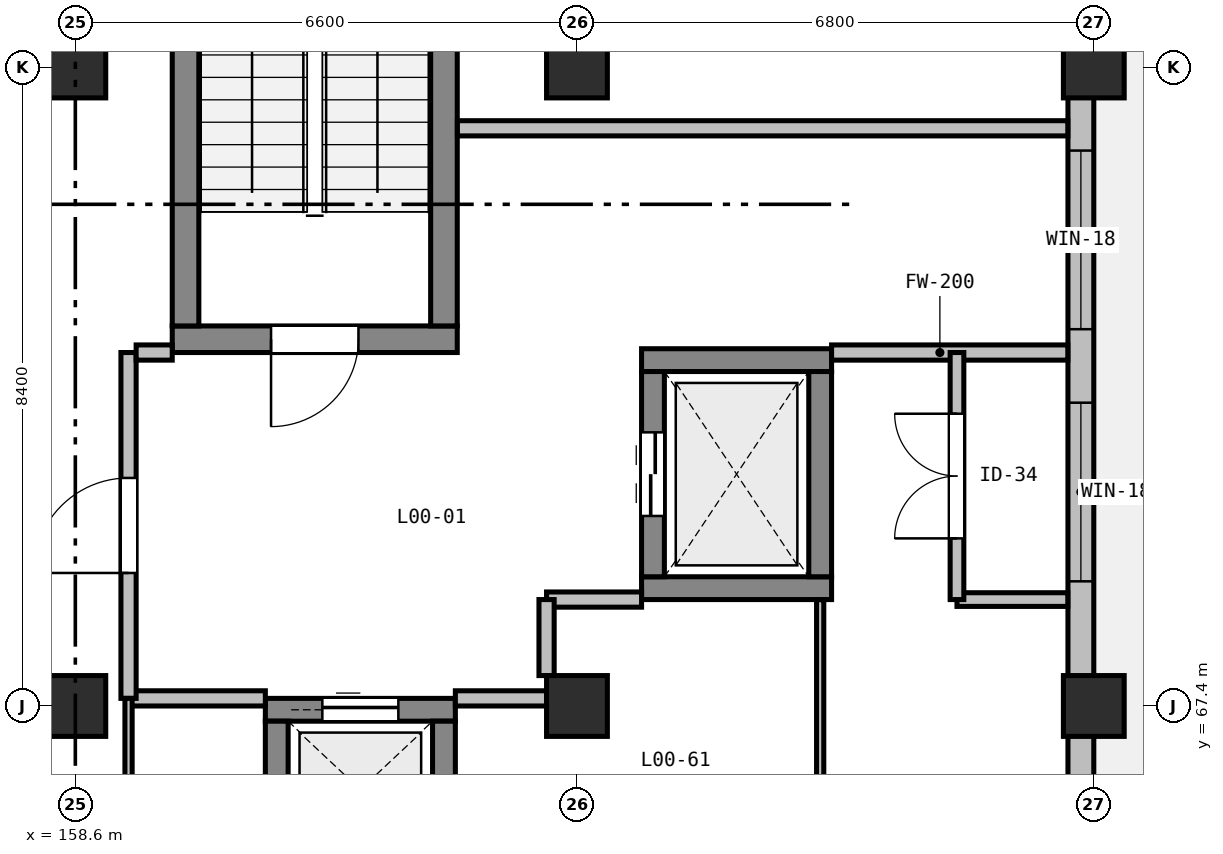
"""IFC4 building model, lengths in metres.
Left out: names, types, materials, properties, quantities, classifications, styles, units other than length and angle.
Written with IfcOpenShell. Run it as: python <this file> out.ifc"""

import sys

from ifc_helpers import new_model, si_unit, direction, frame, frame_2d, origin, origin_2d, place, context, subcontext, project, spatial, rectangle, extrude, element, fill, save


model = new_model("IFC4")
c1 = context("Model", 3, precision=1e-05, world=origin(), true_north=direction((0.0, 1.0)))
c2 = subcontext(c1, "Body", "Model", "MODEL_VIEW")
j1 = project(units=[si_unit("LENGTHUNIT", "METRE"), si_unit("PLANEANGLEUNIT", "RADIAN")], contexts=[c1])
p1 = place(None, origin())
s1 = spatial("IfcSite", under=j1, at=p1, CompositionType="ELEMENT")
p2 = place(p1, origin())
s2 = spatial("IfcBuilding", under=s1, at=p2, CompositionType="ELEMENT")
p3 = place(p2, origin())
s3 = spatial("IfcBuildingStorey", under=s2, at=p3, CompositionType="ELEMENT", Elevation=0.0)
for number, where, z_axis, x_axis in (
    (1, (158.6, 67.4, 0.0), (0.0, 0.0, 1.0), (1.0, 0.0, 0.0)),
    (2, (158.6, 75.8, 0.0), (0.0, 0.0, 1.0), (1.0, 0.0, 0.0)),
    (3, (165.2, 67.4, 0.0), (0.0, 0.0, 1.0), (1.0, 0.0, 0.0)),
    (4, (165.2, 75.8, 0.0), (0.0, 0.0, 1.0), (1.0, 0.0, 0.0)),
    (5, (172.0, 67.4, 0.0), (0.0, 0.0, 1.0), (1.0, 0.0, 0.0)),
    (6, (172.0, 75.8, 0.0), (0.0, 0.0, 1.0), (1.0, 0.0, 0.0)),
):
    element("IfcColumn", number, at=place(p3, frame(where, z_axis=z_axis, x_axis=x_axis)), inside=s3, PredefinedType="COLUMN", context=c2, shape_type="SweptSolid", body=[
        extrude(rectangle(XDim=0.8, YDim=0.8, at=origin_2d()), origin(), (0.0, 0.0, 1.0), 5.4),
    ])
p4 = place(p3, frame((163.625, 72.225, 0.0), z_axis=(0.0, 0.0, 1.0), x_axis=(-1.0, 0.0, 0.0)))
e7 = element("IfcWall", 7, at=p4, inside=s3, PredefinedType="SHEAR", context=c2, shape_type="SweptSolid", body=[
    extrude(rectangle(XDim=3.75, YDim=0.35, at=frame_2d((1.875, 0.0))), origin(), (0.0, 0.0, 1.0), 5.4),
])
p5 = place(p4, frame((1.3, 0.0, 0.0)))
e8 = element("IfcOpeningElement", 8, at=p5, cuts=e7, PredefinedType="OPENING", context=c2, shape_type="SweptSolid", body=[
    extrude(rectangle(XDim=1.15, YDim=2.15, at=frame_2d((0.575, 1.075))), frame((0.0, 0.185, 0.0), z_axis=(0.0, -1.0, 0.0), x_axis=(1.0, 0.0, 0.0)), (0.0, 0.0, 1.0), 0.37),
])
for number, where, z_axis, x_axis in (
    (9, (160.05, 72.4, 0.0), (0.0, 0.0, 1.0), (0.0, 1.0, 0.0)),
    (10, (163.45, 72.4, 0.0), (0.0, 0.0, 1.0), (0.0, 1.0, 0.0)),
):
    element("IfcWall", number, at=place(p3, frame(where, z_axis=z_axis, x_axis=x_axis)), inside=s3, PredefinedType="SHEAR", context=c2, shape_type="SweptSolid", body=[
        extrude(rectangle(XDim=7.375, YDim=0.35, at=frame_2d((3.688, 0.0))), origin(), (0.0, 0.0, 1.0), 5.4),
    ])
for number, where, z_axis, x_axis in (
    (11, (166.05, 68.95, 0.0), (0.0, 0.0, 1.0), (1.0, 0.0, 0.0)),
    (12, (166.05, 71.95, 0.0), (0.0, 0.0, 1.0), (1.0, 0.0, 0.0)),
):
    element("IfcWall", number, at=place(p3, frame(where, z_axis=z_axis, x_axis=x_axis)), inside=s3, PredefinedType="SHEAR", context=c2, shape_type="SweptSolid", body=[
        extrude(rectangle(XDim=2.5, YDim=0.3, at=frame_2d((1.25, 0.0))), origin(), (0.0, 0.0, 1.0), 5.4),
    ])
p6 = place(p3, frame((166.2, 69.1, 0.0), z_axis=(0.0, 0.0, 1.0), x_axis=(0.0, 1.0, 0.0)))
e13 = element("IfcWall", 13, at=p6, inside=s3, PredefinedType="SHEAR", context=c2, shape_type="SweptSolid", body=[
    extrude(rectangle(XDim=2.7, YDim=0.3, at=frame_2d((1.35, 0.0))), origin(), (0.0, 0.0, 1.0), 5.4),
])
p7 = place(p6, frame((0.8, 0.0, 0.0)))
e14 = element("IfcOpeningElement", 14, at=p7, cuts=e13, PredefinedType="OPENING", context=c2, shape_type="SweptSolid", body=[
    extrude(rectangle(XDim=1.1, YDim=2.1, at=frame_2d((0.55, 1.05))), frame((0.0, 0.16, 0.0), z_axis=(0.0, -1.0, 0.0), x_axis=(1.0, 0.0, 0.0)), (0.0, 0.0, 1.0), 0.32),
])
p8 = place(p3, frame((168.4, 69.1, 0.0), z_axis=(0.0, 0.0, 1.0), x_axis=(0.0, 1.0, 0.0)))
e15 = element("IfcWall", 15, at=p8, inside=s3, PredefinedType="SHEAR", context=c2, shape_type="SweptSolid", body=[
    extrude(rectangle(XDim=2.7, YDim=0.3, at=frame_2d((1.35, 0.0))), origin(), (0.0, 0.0, 1.0), 5.4),
])
p9 = place(p3, frame((161.1, 67.35, 0.0), z_axis=(0.0, 0.0, 1.0), x_axis=(1.0, 0.0, 0.0)))
e16 = element("IfcWall", 16, at=p9, inside=s3, PredefinedType="SHEAR", context=c2, shape_type="SweptSolid", body=[
    extrude(rectangle(XDim=2.5, YDim=0.3, at=frame_2d((1.25, 0.0))), origin(), (0.0, 0.0, 1.0), 5.4),
])
p10 = place(p9, frame((0.75, 0.0, 0.0)))
e17 = element("IfcOpeningElement", 17, at=p10, cuts=e16, PredefinedType="OPENING", context=c2, shape_type="SweptSolid", body=[
    extrude(rectangle(XDim=1.0, YDim=2.1, at=frame_2d((0.5, 1.05))), frame((0.0, 0.16, 0.0), z_axis=(0.0, -1.0, 0.0), x_axis=(1.0, 0.0, 0.0)), (0.0, 0.0, 1.0), 0.32),
])
for number, where, z_axis, x_axis in (
    (18, (161.25, 65.4, 0.0), (0.0, 0.0, 1.0), (0.0, 1.0, 0.0)),
    (19, (163.45, 65.4, 0.0), (0.0, 0.0, 1.0), (0.0, 1.0, 0.0)),
):
    element("IfcWall", number, at=place(p3, frame(where, z_axis=z_axis, x_axis=x_axis)), inside=s3, PredefinedType="SHEAR", context=c2, shape_type="SweptSolid", body=[
        extrude(rectangle(XDim=1.8, YDim=0.3, at=frame_2d((0.9, 0.0))), origin(), (0.0, 0.0, 1.0), 5.4),
    ])
p11 = place(p3, frame((171.83, 83.86, 0.0), z_axis=(0.0, 0.0, 1.0), x_axis=(0.0, -1.0, 0.0)))
e20 = element("IfcWall", 20, at=p11, inside=s3, PredefinedType="STANDARD", context=c2, shape_type="SweptSolid", body=[
    extrude(rectangle(XDim=8.06, YDim=0.34, at=frame_2d((4.03, 0.0))), origin(), (0.0, 0.0, 1.0), 4.685),
])
p12 = place(p11, frame((1.86, 0.0, 0.0)))
e21 = element("IfcOpeningElement", 21, at=p12, cuts=e20, PredefinedType="OPENING", context=c2, shape_type="SweptSolid", body=[
    extrude(rectangle(XDim=1.6, YDim=2.2, at=frame_2d((0.8, 1.1))), frame((0.0, 0.18, 0.0), z_axis=(0.0, -1.0, 0.0), x_axis=(1.0, 0.0, 0.0)), (0.0, 0.0, 1.0), 0.36),
])
p13 = place(p3, frame((171.83, 75.8, 0.0), z_axis=(0.0, 0.0, 1.0), x_axis=(0.0, -1.0, 0.0)))
e22 = element("IfcWall", 22, at=p13, inside=s3, PredefinedType="STANDARD", context=c2, shape_type="SweptSolid", body=[
    extrude(rectangle(XDim=8.4, YDim=0.34, at=frame_2d((4.2, 0.0))), origin(), (0.0, 0.0, 1.0), 4.685),
])
p14 = place(p13, frame((1.093, 0.0, 0.9)))
e23 = element("IfcOpeningElement", 23, at=p14, cuts=e22, PredefinedType="OPENING", context=c2, shape_type="SweptSolid", body=[
    extrude(rectangle(XDim=2.35, YDim=1.5, at=frame_2d((1.175, 0.75))), frame((0.0, 0.18, 0.0), z_axis=(0.0, -1.0, 0.0), x_axis=(1.0, 0.0, 0.0)), (0.0, 0.0, 1.0), 0.36),
])
p15 = place(p13, frame((4.41, 0.0, 0.9)))
e24 = element("IfcOpeningElement", 24, at=p15, cuts=e22, PredefinedType="OPENING", context=c2, shape_type="SweptSolid", body=[
    extrude(rectangle(XDim=2.35, YDim=1.5, at=frame_2d((1.175, 0.75))), frame((0.0, 0.18, 0.0), z_axis=(0.0, -1.0, 0.0), x_axis=(1.0, 0.0, 0.0)), (0.0, 0.0, 1.0), 0.36),
])
p16 = place(p3, frame((171.83, 67.4, 0.0), z_axis=(0.0, 0.0, 1.0), x_axis=(0.0, -1.0, 0.0)))
e25 = element("IfcWall", 25, at=p16, inside=s3, PredefinedType="STANDARD", context=c2, shape_type="SweptSolid", body=[
    extrude(rectangle(XDim=8.06, YDim=0.34, at=frame_2d((4.03, 0.0))), origin(), (0.0, 0.0, 1.0), 4.685),
])
p17 = place(p16, frame((1.64, 0.0, 0.75)))
e26 = element("IfcOpeningElement", 26, at=p17, cuts=e25, PredefinedType="OPENING", context=c2, shape_type="SweptSolid", body=[
    extrude(rectangle(XDim=1.3, YDim=2.4, at=frame_2d((0.65, 1.2))), frame((0.0, 0.18, 0.0), z_axis=(0.0, -1.0, 0.0), x_axis=(1.0, 0.0, 0.0)), (0.0, 0.0, 1.0), 0.36),
])
p18 = place(p16, frame((5.234, 0.0, 0.75)))
e27 = element("IfcOpeningElement", 27, at=p18, cuts=e25, PredefinedType="OPENING", context=c2, shape_type="SweptSolid", body=[
    extrude(rectangle(XDim=1.3, YDim=2.4, at=frame_2d((0.65, 1.2))), frame((0.0, 0.18, 0.0), z_axis=(0.0, -1.0, 0.0), x_axis=(1.0, 0.0, 0.0)), (0.0, 0.0, 1.0), 0.36),
])
p19 = place(p3, frame((163.627, 75.0, 0.0), z_axis=(0.0, 0.0, 1.0), x_axis=(1.0, 0.0, 0.0)))
e28 = element("IfcWall", 28, at=p19, inside=s3, PredefinedType="PARTITIONING", context=c2, shape_type="SweptSolid", body=[
    extrude(rectangle(XDim=8.031, YDim=0.2, at=frame_2d((4.016, 0.0))), origin(), (0.0, 0.0, 1.0), 4.535),
])
p20 = place(p3, frame((171.658, 72.05, 0.0), z_axis=(0.0, 0.0, 1.0), x_axis=(-1.0, 0.0, 0.0)))
e29 = element("IfcWall", 29, at=p20, inside=s3, PredefinedType="PARTITIONING", context=c2, shape_type="SweptSolid", body=[
    extrude(rectangle(XDim=3.108, YDim=0.2, at=frame_2d((1.554, 0.0))), origin(), (0.0, 0.0, 1.0), 4.685),
])
p21 = place(p3, frame((166.05, 68.8, 0.0), z_axis=(0.0, 0.0, 1.0), x_axis=(-1.0, 0.0, 0.0)))
e30 = element("IfcWall", 30, at=p21, inside=s3, PredefinedType="PARTITIONING", context=c2, shape_type="SweptSolid", body=[
    extrude(rectangle(XDim=1.25, YDim=0.2, at=frame_2d((0.625, 0.0))), origin(), (0.0, 0.0, 1.0), 4.535),
])
p22 = place(p3, frame((164.8, 68.8, 0.0), z_axis=(0.0, 0.0, 1.0), x_axis=(0.0, -1.0, 0.0)))
e31 = element("IfcWall", 31, at=p22, inside=s3, PredefinedType="PARTITIONING", context=c2, shape_type="SweptSolid", body=[
    extrude(rectangle(XDim=1.0, YDim=0.2, at=frame_2d((0.5, 0.0))), origin(), (0.0, 0.0, 1.0), 5.095),
])
p23 = place(p3, frame((164.8, 67.5, 0.0), z_axis=(0.0, 0.0, 1.0), x_axis=(-1.0, 0.0, 0.0)))
e32 = element("IfcWall", 32, at=p23, inside=s3, PredefinedType="PARTITIONING", context=c2, shape_type="SweptSolid", body=[
    extrude(rectangle(XDim=1.2, YDim=0.2, at=frame_2d((0.6, 0.0))), origin(), (0.0, 0.0, 1.0), 4.735),
])
p24 = place(p3, frame((161.1, 67.5, 0.0), z_axis=(0.0, 0.0, 1.0), x_axis=(-1.0, 0.0, 0.0)))
e33 = element("IfcWall", 33, at=p24, inside=s3, PredefinedType="PARTITIONING", context=c2, shape_type="SweptSolid", body=[
    extrude(rectangle(XDim=1.8, YDim=0.2, at=frame_2d((0.9, 0.0))), origin(), (0.0, 0.0, 1.0), 4.735),
])
p25 = place(p3, frame((159.3, 67.5, 0.0), z_axis=(0.0, 0.0, 1.0), x_axis=(0.0, 1.0, 0.0)))
e34 = element("IfcWall", 34, at=p25, inside=s3, PredefinedType="PARTITIONING", context=c2, shape_type="SweptSolid", body=[
    extrude(rectangle(XDim=4.55, YDim=0.2, at=frame_2d((2.275, 0.0))), origin(), (0.0, 0.0, 1.0), 4.735),
])
p26 = place(p25, frame((1.65, 0.0, 0.0)))
e35 = element("IfcOpeningElement", 35, at=p26, cuts=e34, PredefinedType="OPENING", context=c2, shape_type="SweptSolid", body=[
    extrude(rectangle(XDim=1.25, YDim=2.15, at=frame_2d((0.625, 1.075))), frame((0.0, 0.11, 0.0), z_axis=(0.0, -1.0, 0.0), x_axis=(1.0, 0.0, 0.0)), (0.0, 0.0, 1.0), 0.22),
])
p27 = place(p3, frame((159.4, 72.05, 0.0), z_axis=(0.0, 0.0, 1.0), x_axis=(1.0, 0.0, 0.0)))
e36 = element("IfcWall", 36, at=p27, inside=s3, PredefinedType="PARTITIONING", context=c2, shape_type="SweptSolid", body=[
    extrude(rectangle(XDim=0.475, YDim=0.2, at=frame_2d((0.238, 0.0))), origin(), (0.0, 0.0, 1.0), 5.095),
])
p28 = place(p3, frame((168.4, 68.798, 0.0), z_axis=(0.0, 0.0, 1.0), x_axis=(0.0, -1.0, 0.0)))
e37 = element("IfcWall", 37, at=p28, inside=s3, PredefinedType="PARTITIONING", context=c2, shape_type="SweptSolid", body=[
    extrude(rectangle(XDim=6.198, YDim=0.095, at=frame_2d((3.099, 0.0))), origin(), (0.0, 0.0, 1.0), 4.735),
])
p29 = place(p3, frame((159.3, 65.05, 0.0), z_axis=(0.0, 0.0, 1.0), x_axis=(0.0, 1.0, 0.0)))
e38 = element("IfcWall", 38, at=p29, inside=s3, PredefinedType="PARTITIONING", context=c2, shape_type="SweptSolid", body=[
    extrude(rectangle(XDim=2.45, YDim=0.095, at=frame_2d((1.225, 0.0))), origin(), (0.0, 0.0, 1.0), 4.735),
])
p30 = place(p3, frame((171.658, 68.8, 0.0), z_axis=(0.0, 0.0, 1.0), x_axis=(-1.0, 0.0, 0.0)))
e39 = element("IfcWall", 39, at=p30, inside=s3, PredefinedType="PARTITIONING", context=c2, shape_type="SweptSolid", body=[
    extrude(rectangle(XDim=1.458, YDim=0.18, at=frame_2d((0.729, 0.0))), origin(), (0.0, 0.0, 1.0), 4.685),
])
p31 = place(p3, frame((170.2, 68.8, 0.0), z_axis=(0.0, 0.0, 1.0), x_axis=(0.0, 1.0, 0.0)))
e40 = element("IfcWall", 40, at=p31, inside=s3, PredefinedType="PARTITIONING", context=c2, shape_type="SweptSolid", body=[
    extrude(rectangle(XDim=3.25, YDim=0.18, at=frame_2d((1.625, 0.0))), origin(), (0.0, 0.0, 1.0), 5.095),
])
p32 = place(p31, frame((0.805, 0.0, 0.0)))
e41 = element("IfcOpeningElement", 41, at=p32, cuts=e40, PredefinedType="OPENING", context=c2, shape_type="SweptSolid", body=[
    extrude(rectangle(XDim=1.64, YDim=2.2, at=frame_2d((0.82, 1.1))), frame((0.0, 0.1, 0.0), z_axis=(0.0, -1.0, 0.0), x_axis=(1.0, 0.0, 0.0)), (0.0, 0.0, 1.0), 0.2),
])
p33 = place(p14, origin())
e42 = element("IfcWindow", 42, at=p33, inside=s3, PartitioningType="SINGLE_PANEL", PredefinedType="WINDOW", context=c2, shape_type="SweptSolid", body=[
    extrude(rectangle(XDim=2.35, YDim=1.5, at=frame_2d((1.175, 0.75))), frame((0.0, 0.03, 0.0), z_axis=(0.0, -1.0, 0.0), x_axis=(1.0, 0.0, 0.0)), (0.0, 0.0, 1.0), 0.06),
])
fill(e23, e42)
p34 = place(p15, origin())
e43 = element("IfcWindow", 43, at=p34, inside=s3, PartitioningType="SINGLE_PANEL", PredefinedType="WINDOW", context=c2, shape_type="SweptSolid", body=[
    extrude(rectangle(XDim=2.35, YDim=1.5, at=frame_2d((1.175, 0.75))), frame((0.0, 0.03, 0.0), z_axis=(0.0, -1.0, 0.0), x_axis=(1.0, 0.0, 0.0)), (0.0, 0.0, 1.0), 0.06),
])
fill(e24, e43)
p35 = place(p5, origin())
e44 = element("IfcDoor", 44, at=p35, inside=s3, OperationType="SINGLE_SWING_RIGHT", PredefinedType="DOOR", context=c2, shape_type="SweptSolid", body=[
    extrude(rectangle(XDim=1.15, YDim=2.15, at=frame_2d((0.575, 1.075))), frame((0.0, 0.025, 0.0), z_axis=(0.0, -1.0, 0.0), x_axis=(1.0, 0.0, 0.0)), (0.0, 0.0, 1.0), 0.05),
])
fill(e8, e44)
p36 = place(p7, origin())
e45 = element("IfcDoor", 45, at=p36, inside=s3, OperationType="DOUBLE_DOOR_SLIDING", PredefinedType="DOOR", context=c2, shape_type="SweptSolid", body=[
    extrude(rectangle(XDim=1.1, YDim=2.1, at=frame_2d((0.55, 1.05))), frame((0.0, 0.025, 0.0), z_axis=(0.0, -1.0, 0.0), x_axis=(1.0, 0.0, 0.0)), (0.0, 0.0, 1.0), 0.05),
])
fill(e14, e45)
p37 = place(p10, origin())
e46 = element("IfcDoor", 46, at=p37, inside=s3, OperationType="SLIDING_TO_LEFT", PredefinedType="DOOR", context=c2, shape_type="SweptSolid", body=[
    extrude(rectangle(XDim=1.0, YDim=2.1, at=frame_2d((0.5, 1.05))), frame((0.0, 0.025, 0.0), z_axis=(0.0, -1.0, 0.0), x_axis=(1.0, 0.0, 0.0)), (0.0, 0.0, 1.0), 0.05),
])
fill(e17, e46)
p38 = place(p26, origin())
e47 = element("IfcDoor", 47, at=p38, inside=s3, OperationType="SINGLE_SWING_LEFT", PredefinedType="DOOR", context=c2, shape_type="SweptSolid", body=[
    extrude(rectangle(XDim=1.25, YDim=2.15, at=frame_2d((0.625, 1.075))), frame((0.0, 0.025, 0.0), z_axis=(0.0, -1.0, 0.0), x_axis=(1.0, 0.0, 0.0)), (0.0, 0.0, 1.0), 0.05),
])
fill(e35, e47)
p39 = place(p32, origin())
e48 = element("IfcDoor", 48, at=p39, inside=s3, OperationType="DOUBLE_DOOR_SINGLE_SWING", PredefinedType="DOOR", context=c2, shape_type="SweptSolid", body=[
    extrude(rectangle(XDim=1.64, YDim=2.2, at=frame_2d((0.82, 1.1))), frame((0.0, 0.025, 0.0), z_axis=(0.0, -1.0, 0.0), x_axis=(1.0, 0.0, 0.0)), (0.0, 0.0, 1.0), 0.05),
])
fill(e41, e48)
save(model, sys.argv[1])
